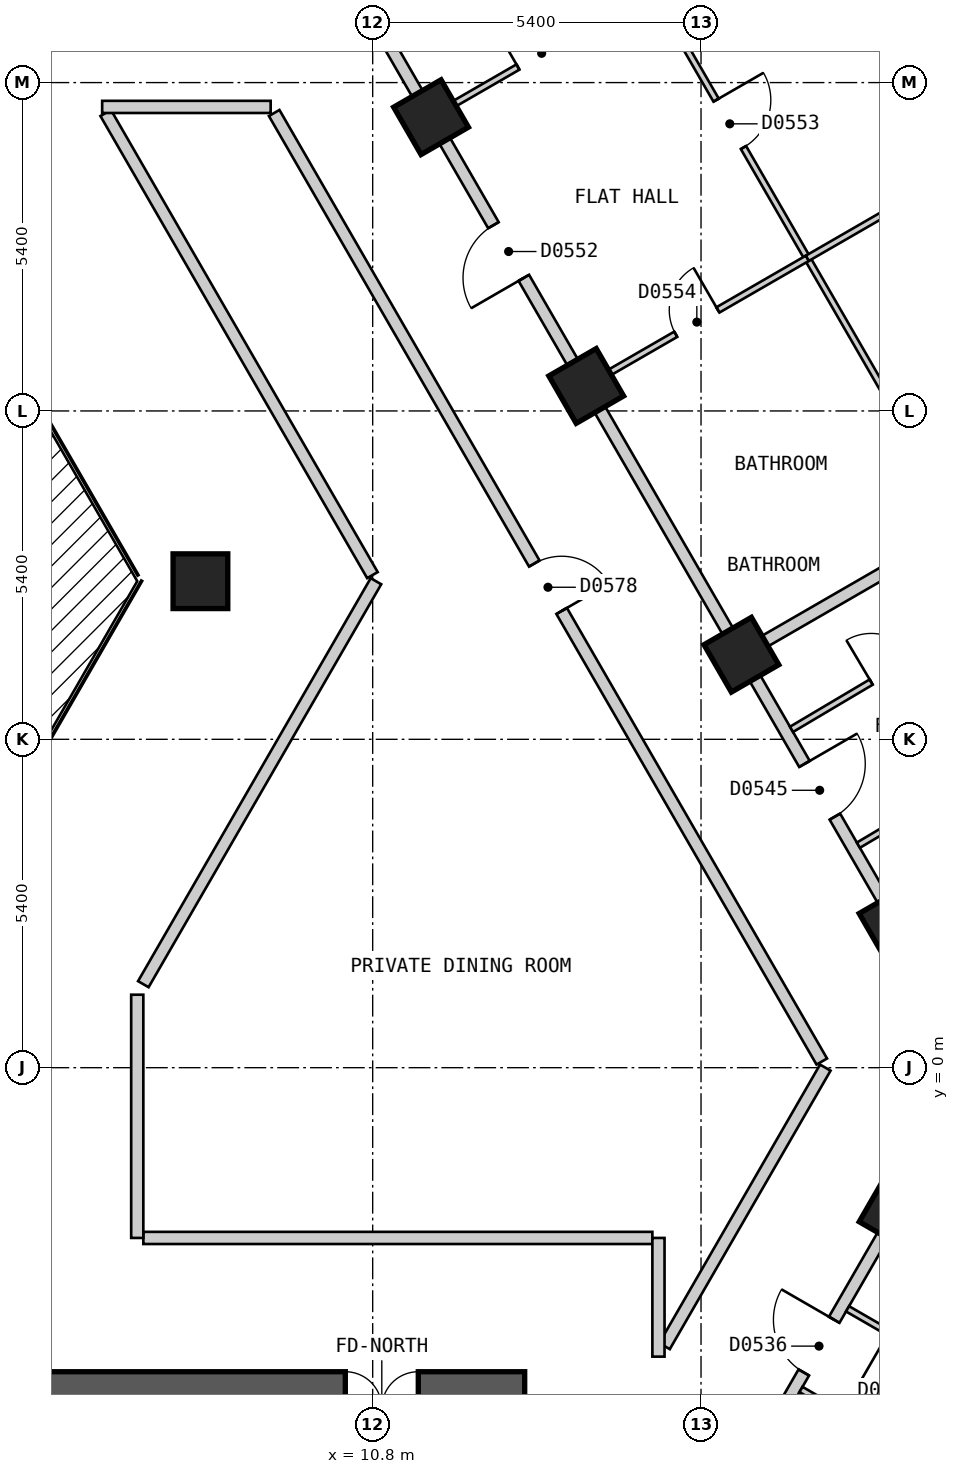
"""IFC4 building model, lengths in metres.
Left out: names, types, materials, properties, quantities, classifications, styles, units other than length and angle.
Written with IfcOpenShell. Run it as: python <this file> out.ifc"""

import sys

from ifc_helpers import new_model, si_unit, direction, frame, frame_2d, origin, origin_2d, place, context, subcontext, project, spatial, polyline, rectangle, outline, extrude, element, fill, save


model = new_model("IFC4")
c1 = context("Model", 3, precision=1e-05, world=origin(), true_north=direction((0.0, 1.0)))
c2 = subcontext(c1, "Body", "Model", "MODEL_VIEW")
j1 = project(units=[si_unit("LENGTHUNIT", "METRE"), si_unit("PLANEANGLEUNIT", "RADIAN")], contexts=[c1])
p1 = place(None, origin())
s1 = spatial("IfcSite", under=j1, at=p1, CompositionType="ELEMENT")
p2 = place(p1, origin())
s2 = spatial("IfcBuilding", under=s1, at=p2, CompositionType="ELEMENT")
p3 = place(p2, frame((0.0, 0.0, 56.4)))
s3 = spatial("IfcBuildingStorey", under=s2, at=p3, CompositionType="ELEMENT", Elevation=56.4)
for number, where, z_axis, x_axis in (
    (1, (19.417, -2.369, 0.0), (0.0, 0.0, 1.0), (0.5, 0.866, 0.0)),
    (2, (19.416, 2.371, 0.0), (0.0, 0.0, 1.0), (-0.5, 0.866, 0.0)),
    (3, (16.864, 6.791, 0.0), (0.0, 0.0, 1.0), (-0.5, 0.866, 0.0)),
    (4, (14.312, 11.211, 0.0), (0.0, 0.0, 1.0), (-0.5, 0.866, 0.0)),
    (5, (7.967, 8.0, 0.0), (0.0, 0.0, 1.0), (1.0, 0.0, 0.0)),
    (6, (11.76, 15.631, 0.0), (0.0, 0.0, 1.0), (-0.5, 0.866, 0.0)),
):
    element("IfcColumn", number, at=place(p3, frame(where, z_axis=z_axis, x_axis=x_axis)), inside=s3, PredefinedType="COLUMN", context=c2, shape_type="SweptSolid", body=[
        extrude(rectangle(XDim=0.9, YDim=0.9, at=origin_2d()), origin(), (0.0, 0.0, 1.0), 3.0),
    ])
p4 = place(p3, frame((-13.3, -5.6, 0.0), z_axis=(0.0, 0.0, 1.0), x_axis=(1.0, 0.0, 0.0)))
e7 = element("IfcWall", 7, at=p4, inside=s3, PredefinedType="SHEAR", context=c2, shape_type="SweptSolid", body=[
    extrude(rectangle(XDim=26.6, YDim=1.2, at=frame_2d((13.3, 0.0))), origin(), (0.0, 0.0, 1.0), 2.7),
])
p5 = place(p4, frame((23.65, 0.0, 0.0)))
e8 = element("IfcOpeningElement", 8, at=p5, cuts=e7, PredefinedType="OPENING", context=c2, shape_type="SweptSolid", body=[
    extrude(rectangle(XDim=1.2, YDim=2.1, at=frame_2d((0.6, 1.05))), frame((0.0, 0.61, 0.0), z_axis=(0.0, -1.0, 0.0), x_axis=(1.0, 0.0, 0.0)), (0.0, 0.0, 1.0), 1.22),
])
p6 = place(p3, frame((17.71, -25.825, 0.0), z_axis=(0.0, 0.0, 1.0), x_axis=(0.500001938803, 0.866024284413, 0.0)))
e9 = element("IfcWall", 9, at=p6, inside=s3, PredefinedType="SOLIDWALL", context=c2, shape_type="SweptSolid", body=[
    extrude(outline(polyline([(0.0, -0.15), (27.02, -0.15), (26.94, 0.15), (0.08, 0.15), (0.0, -0.15)])), origin(), (0.0, 0.0, 1.0), 2.7),
])
p7 = place(p6, frame((2.553, 0.0, 0.15)))
e10 = element("IfcOpeningElement", 10, at=p7, cuts=e9, PredefinedType="OPENING", context=c2, shape_type="SweptSolid", body=[
    extrude(rectangle(XDim=1.5, YDim=2.1, at=frame_2d((0.75, 1.05))), frame((0.0, 0.16, 0.0), z_axis=(0.0, -1.0, 0.0), x_axis=(1.0, 0.0, 0.0)), (0.0, 0.0, 1.0), 0.32),
])
p8 = place(p6, frame((7.658, 0.0, 0.15)))
e11 = element("IfcOpeningElement", 11, at=p8, cuts=e9, PredefinedType="OPENING", context=c2, shape_type="SweptSolid", body=[
    extrude(rectangle(XDim=1.5, YDim=2.1, at=frame_2d((0.75, 1.05))), frame((0.0, 0.16, 0.0), z_axis=(0.0, -1.0, 0.0), x_axis=(1.0, 0.0, 0.0)), (0.0, 0.0, 1.0), 0.32),
])
p9 = place(p6, frame((12.761, 0.0, 0.15)))
e12 = element("IfcOpeningElement", 12, at=p9, cuts=e9, PredefinedType="OPENING", context=c2, shape_type="SweptSolid", body=[
    extrude(rectangle(XDim=1.5, YDim=2.1, at=frame_2d((0.75, 1.05))), frame((0.0, 0.16, 0.0), z_axis=(0.0, -1.0, 0.0), x_axis=(1.0, 0.0, 0.0)), (0.0, 0.0, 1.0), 0.32),
])
p10 = place(p6, frame((17.865, 0.0, 0.15)))
e13 = element("IfcOpeningElement", 13, at=p10, cuts=e9, PredefinedType="OPENING", context=c2, shape_type="SweptSolid", body=[
    extrude(rectangle(XDim=1.5, YDim=2.1, at=frame_2d((0.75, 1.05))), frame((0.0, 0.16, 0.0), z_axis=(0.0, -1.0, 0.0), x_axis=(1.0, 0.0, 0.0)), (0.0, 0.0, 1.0), 0.32),
])
p11 = place(p6, frame((22.969, 0.0, 0.15)))
e14 = element("IfcOpeningElement", 14, at=p11, cuts=e9, PredefinedType="OPENING", context=c2, shape_type="SweptSolid", body=[
    extrude(rectangle(XDim=1.5, YDim=2.1, at=frame_2d((0.75, 1.05))), frame((0.0, 0.16, 0.0), z_axis=(0.0, -1.0, 0.0), x_axis=(1.0, 0.0, 0.0)), (0.0, 0.0, 1.0), 0.32),
])
p12 = place(p3, frame((31.22, 2.425, 0.0), z_axis=(0.0, 0.0, 1.0), x_axis=(-0.500001938803, 0.866024284413, 0.0)))
e15 = element("IfcWall", 15, at=p12, inside=s3, PredefinedType="SOLIDWALL", context=c2, shape_type="SweptSolid", body=[
    extrude(outline(polyline([(0.0, -0.15), (27.02, -0.15), (26.94, 0.15), (0.08, 0.15), (0.0, -0.15)])), origin(), (0.0, 0.0, 1.0), 2.7),
])
p13 = place(p12, frame((2.553, 0.0, 0.15)))
e16 = element("IfcOpeningElement", 16, at=p13, cuts=e15, PredefinedType="OPENING", context=c2, shape_type="SweptSolid", body=[
    extrude(rectangle(XDim=1.5, YDim=2.1, at=frame_2d((0.75, 1.05))), frame((0.0, 0.16, 0.0), z_axis=(0.0, -1.0, 0.0), x_axis=(1.0, 0.0, 0.0)), (0.0, 0.0, 1.0), 0.32),
])
p14 = place(p12, frame((7.657, 0.0, 0.15)))
e17 = element("IfcOpeningElement", 17, at=p14, cuts=e15, PredefinedType="OPENING", context=c2, shape_type="SweptSolid", body=[
    extrude(rectangle(XDim=1.5, YDim=2.1, at=frame_2d((0.75, 1.05))), frame((0.0, 0.16, 0.0), z_axis=(0.0, -1.0, 0.0), x_axis=(1.0, 0.0, 0.0)), (0.0, 0.0, 1.0), 0.32),
])
p15 = place(p12, frame((12.761, 0.0, 0.15)))
e18 = element("IfcOpeningElement", 18, at=p15, cuts=e15, PredefinedType="OPENING", context=c2, shape_type="SweptSolid", body=[
    extrude(rectangle(XDim=1.5, YDim=2.1, at=frame_2d((0.75, 1.05))), frame((0.0, 0.16, 0.0), z_axis=(0.0, -1.0, 0.0), x_axis=(1.0, 0.0, 0.0)), (0.0, 0.0, 1.0), 0.32),
])
p16 = place(p12, frame((17.865, 0.0, 0.15)))
e19 = element("IfcOpeningElement", 19, at=p16, cuts=e15, PredefinedType="OPENING", context=c2, shape_type="SweptSolid", body=[
    extrude(rectangle(XDim=1.5, YDim=2.1, at=frame_2d((0.75, 1.05))), frame((0.0, 0.16, 0.0), z_axis=(0.0, -1.0, 0.0), x_axis=(1.0, 0.0, 0.0)), (0.0, 0.0, 1.0), 0.32),
])
p17 = place(p12, frame((22.969, 0.0, 0.15)))
e20 = element("IfcOpeningElement", 20, at=p17, cuts=e15, PredefinedType="OPENING", context=c2, shape_type="SweptSolid", body=[
    extrude(rectangle(XDim=1.5, YDim=2.1, at=frame_2d((0.75, 1.05))), frame((0.0, 0.16, 0.0), z_axis=(0.0, -1.0, 0.0), x_axis=(1.0, 0.0, 0.0)), (0.0, 0.0, 1.0), 0.32),
])
p18 = place(p3, frame((6.409, 15.7, 0.0), z_axis=(0.0, 0.0, 1.0), x_axis=(0.499930377127, -0.866065596838, 0.0)))
e21 = element("IfcWall", 21, at=p18, inside=s3, PredefinedType="PARTITIONING", context=c2, shape_type="SweptSolid", body=[
    extrude(rectangle(XDim=8.775, YDim=0.2, at=frame_2d((4.388, 0.0))), origin(), (0.0, 0.0, 1.0), 2.7),
])
p19 = place(p3, frame((9.18, 15.7, 0.0), z_axis=(0.0, 0.0, 1.0), x_axis=(0.500003652032, -0.866023295272, 0.0)))
e22 = element("IfcWall", 22, at=p19, inside=s3, PredefinedType="PARTITIONING", context=c2, shape_type="SweptSolid", body=[
    extrude(rectangle(XDim=18.012, YDim=0.2, at=frame_2d((9.006, 0.0))), origin(), (0.0, 0.0, 1.0), 2.7),
])
p20 = place(p19, frame((8.556, 0.0, 0.0)))
e23 = element("IfcOpeningElement", 23, at=p20, cuts=e22, PredefinedType="OPENING", context=c2, shape_type="SweptSolid", body=[
    extrude(rectangle(XDim=0.9, YDim=2.1, at=frame_2d((0.45, 1.05))), frame((0.0, 0.11, 0.0), z_axis=(0.0, -1.0, 0.0), x_axis=(1.0, 0.0, 0.0)), (0.0, 0.0, 1.0), 0.22),
])
p21 = place(p3, frame((10.45, 17.9, 0.0), z_axis=(0.0, 0.0, 1.0), x_axis=(0.500034352617, -0.866005569383, 0.0)))
e24 = element("IfcWall", 24, at=p21, inside=s3, PredefinedType="PARTITIONING", context=c2, shape_type="SweptSolid", body=[
    extrude(rectangle(XDim=20.553, YDim=0.2, at=frame_2d((10.276, 0.0))), origin(), (0.0, 0.0, 1.0), 2.7),
])
p22 = place(p21, frame((14.902, 0.0, 0.0)))
e25 = element("IfcOpeningElement", 25, at=p22, cuts=e24, PredefinedType="OPENING", context=c2, shape_type="SweptSolid", body=[
    extrude(rectangle(XDim=1.0, YDim=2.1, at=frame_2d((0.5, 1.05))), frame((0.0, 0.11, 0.0), z_axis=(0.0, -1.0, 0.0), x_axis=(1.0, 0.0, 0.0)), (0.0, 0.0, 1.0), 0.22),
])
p23 = place(p21, frame((4.671, 0.0, 0.0)))
e26 = element("IfcOpeningElement", 26, at=p23, cuts=e24, PredefinedType="OPENING", context=c2, shape_type="SweptSolid", body=[
    extrude(rectangle(XDim=1.0, YDim=2.1, at=frame_2d((0.5, 1.05))), frame((0.0, 0.11, 0.0), z_axis=(0.0, -1.0, 0.0), x_axis=(1.0, 0.0, 0.0)), (0.0, 0.0, 1.0), 0.22),
])
p24 = place(p3, frame((7.028, -2.8, 0.0), z_axis=(0.0, 0.0, 1.0), x_axis=(1.0, 0.0, 0.0)))
e27 = element("IfcWall", 27, at=p24, inside=s3, PredefinedType="PARTITIONING", context=c2, shape_type="SweptSolid", body=[
    extrude(rectangle(XDim=8.372, YDim=0.2, at=frame_2d((4.186, 0.0))), origin(), (0.0, 0.0, 1.0), 2.7),
])
p25 = place(p3, frame((6.351, 15.8, 0.0), z_axis=(0.0, 0.0, 1.0), x_axis=(1.0, 0.0, 0.0)))
e28 = element("IfcWall", 28, at=p25, inside=s3, PredefinedType="PARTITIONING", context=c2, shape_type="SweptSolid", body=[
    extrude(rectangle(XDim=2.771, YDim=0.2, at=frame_2d((1.385, 0.0))), origin(), (0.0, 0.0, 1.0), 2.7),
])
p26 = place(p3, frame((7.028, 1.373, 0.0), z_axis=(0.0, 0.0, 1.0), x_axis=(0.49998574534, 0.86603363356, 0.0)))
e29 = element("IfcWall", 29, at=p26, inside=s3, PredefinedType="PARTITIONING", context=c2, shape_type="SweptSolid", body=[
    extrude(rectangle(XDim=7.652, YDim=0.2, at=frame_2d((3.826, 0.0))), origin(), (0.0, 0.0, 1.0), 2.7),
])
p27 = place(p3, frame((15.6, -4.579, 0.0), z_axis=(0.0, 0.0, 1.0), x_axis=(0.499927597274, 0.866067201483, 0.0)))
e30 = element("IfcWall", 30, at=p27, inside=s3, PredefinedType="PARTITIONING", context=c2, shape_type="SweptSolid", body=[
    extrude(rectangle(XDim=5.288, YDim=0.2, at=frame_2d((2.644, 0.0))), origin(), (0.0, 0.0, 1.0), 2.7),
])
p28 = place(p3, frame((15.707, -8.794, 0.0), z_axis=(0.0, 0.0, 1.0), x_axis=(0.50000451406, 0.866022797575, 0.0)))
e31 = element("IfcWall", 31, at=p28, inside=s3, PredefinedType="PARTITIONING", context=c2, shape_type="SweptSolid", body=[
    extrude(rectangle(XDim=10.04, YDim=0.2, at=frame_2d((5.02, 0.0))), origin(), (0.0, 0.0, 1.0), 2.7),
])
p29 = place(p28, frame((4.367, 0.0, 0.0)))
e32 = element("IfcOpeningElement", 32, at=p29, cuts=e31, PredefinedType="OPENING", context=c2, shape_type="SweptSolid", body=[
    extrude(rectangle(XDim=1.0, YDim=2.1, at=frame_2d((0.5, 1.05))), frame((0.0, 0.11, 0.0), z_axis=(0.0, -1.0, 0.0), x_axis=(1.0, 0.0, 0.0)), (0.0, 0.0, 1.0), 0.22),
])
p30 = place(p28, frame((8.402, 0.0, 0.0)))
e33 = element("IfcOpeningElement", 33, at=p30, cuts=e31, PredefinedType="OPENING", context=c2, shape_type="SweptSolid", body=[
    extrude(rectangle(XDim=0.8, YDim=2.1, at=frame_2d((0.4, 1.05))), frame((0.0, 0.11, 0.0), z_axis=(0.0, -1.0, 0.0), x_axis=(1.0, 0.0, 0.0)), (0.0, 0.0, 1.0), 0.22),
])
p31 = place(p3, frame((6.928, -2.8, 0.0), z_axis=(0.0, 0.0, 1.0), x_axis=(0.0, 1.0, 0.0)))
e34 = element("IfcWall", 34, at=p31, inside=s3, PredefinedType="PARTITIONING", context=c2, shape_type="SweptSolid", body=[
    extrude(rectangle(XDim=4.0, YDim=0.2, at=frame_2d((2.0, 0.0))), origin(), (0.0, 0.0, 1.0), 2.7),
])
p32 = place(p3, frame((15.5, -4.752, 0.0), z_axis=(0.0, 0.0, 1.0), x_axis=(0.0, 1.0, 0.0)))
e35 = element("IfcWall", 35, at=p32, inside=s3, PredefinedType="PARTITIONING", context=c2, shape_type="SweptSolid", body=[
    extrude(rectangle(XDim=1.952, YDim=0.2, at=frame_2d((0.976, 0.0))), origin(), (0.0, 0.0, 1.0), 2.7),
])
p33 = place(p3, frame((12.875, 22.1, 0.0), z_axis=(0.0, 0.0, 1.0), x_axis=(0.499994897061, -0.866028349948, 0.0)))
e36 = element("IfcWall", 36, at=p33, inside=s3, PredefinedType="PARTITIONING", context=c2, shape_type="SweptSolid", body=[
    extrude(rectangle(XDim=15.152, YDim=0.1, at=frame_2d((7.576, 0.0))), origin(), (0.0, 0.0, 1.0), 2.7),
])
p34 = place(p33, frame((7.146, 0.0, 0.0)))
e37 = element("IfcOpeningElement", 37, at=p34, cuts=e36, PredefinedType="OPENING", context=c2, shape_type="SweptSolid", body=[
    extrude(rectangle(XDim=0.9, YDim=2.1, at=frame_2d((0.45, 1.05))), frame((0.0, 0.06, 0.0), z_axis=(0.0, -1.0, 0.0), x_axis=(1.0, 0.0, 0.0)), (0.0, 0.0, 1.0), 0.12),
])
p35 = place(p3, frame((17.844, -5.292, 0.0), z_axis=(0.0, 0.0, 1.0), x_axis=(0.866038211682, -0.499977815414, 0.0)))
e38 = element("IfcWall", 38, at=p35, inside=s3, PredefinedType="PARTITIONING", context=c2, shape_type="SweptSolid", body=[
    extrude(rectangle(XDim=2.51, YDim=0.1, at=frame_2d((1.255, 0.0))), origin(), (0.0, 0.0, 1.0), 2.7),
])
p36 = place(p35, frame((0.83, 0.0, 0.0)))
e39 = element("IfcOpeningElement", 39, at=p36, cuts=e38, PredefinedType="OPENING", context=c2, shape_type="SweptSolid", body=[
    extrude(rectangle(XDim=0.8, YDim=2.1, at=frame_2d((0.4, 1.05))), frame((0.0, 0.06, 0.0), z_axis=(0.0, -1.0, 0.0), x_axis=(1.0, 0.0, 0.0)), (0.0, 0.0, 1.0), 0.12),
])
p37 = place(p3, frame((18.61, -3.966, 0.0), z_axis=(0.0, 0.0, 1.0), x_axis=(0.865958718457, -0.500115484592, 0.0)))
e40 = element("IfcWall", 40, at=p37, inside=s3, PredefinedType="PARTITIONING", context=c2, shape_type="SweptSolid", body=[
    extrude(rectangle(XDim=2.509, YDim=0.1, at=frame_2d((1.255, 0.0))), origin(), (0.0, 0.0, 1.0), 2.7),
])
p38 = place(p37, frame((0.78, 0.0, 0.0)))
e41 = element("IfcOpeningElement", 41, at=p38, cuts=e40, PredefinedType="OPENING", context=c2, shape_type="SweptSolid", body=[
    extrude(rectangle(XDim=0.9, YDim=2.1, at=frame_2d((0.45, 1.05))), frame((0.0, 0.06, 0.0), z_axis=(0.0, -1.0, 0.0), x_axis=(1.0, 0.0, 0.0)), (0.0, 0.0, 1.0), 0.12),
])
p39 = place(p3, frame((11.847, 15.681, 0.0), z_axis=(0.0, 0.0, 1.0), x_axis=(0.865980278416, 0.500078151287, 0.0)))
e42 = element("IfcWall", 42, at=p39, inside=s3, PredefinedType="PARTITIONING", context=c2, shape_type="SweptSolid", body=[
    extrude(rectangle(XDim=4.099, YDim=0.1, at=frame_2d((2.05, 0.0))), origin(), (0.0, 0.0, 1.0), 2.7),
])
p40 = place(p39, frame((1.55, 0.0, 0.0)))
e43 = element("IfcOpeningElement", 43, at=p40, cuts=e42, PredefinedType="OPENING", context=c2, shape_type="SweptSolid", body=[
    extrude(rectangle(XDim=0.9, YDim=2.1, at=frame_2d((0.45, 1.05))), frame((0.0, 0.06, 0.0), z_axis=(0.0, -1.0, 0.0), x_axis=(1.0, 0.0, 0.0)), (0.0, 0.0, 1.0), 0.12),
])
p41 = place(p3, frame((14.399, 11.261, 0.0), z_axis=(0.0, 0.0, 1.0), x_axis=(0.865980278416, 0.500078151287, 0.0)))
e44 = element("IfcWall", 44, at=p41, inside=s3, PredefinedType="PARTITIONING", context=c2, shape_type="SweptSolid", body=[
    extrude(rectangle(XDim=4.099, YDim=0.1, at=frame_2d((2.05, 0.0))), origin(), (0.0, 0.0, 1.0), 2.7),
])
p42 = place(p41, frame((1.6, 0.0, 0.0)))
e45 = element("IfcOpeningElement", 45, at=p42, cuts=e44, PredefinedType="OPENING", context=c2, shape_type="SweptSolid", body=[
    extrude(rectangle(XDim=0.8, YDim=2.1, at=frame_2d((0.4, 1.05))), frame((0.0, 0.06, 0.0), z_axis=(0.0, -1.0, 0.0), x_axis=(1.0, 0.0, 0.0)), (0.0, 0.0, 1.0), 0.12),
])
p43 = place(p3, frame((17.688, 5.564, 0.0), z_axis=(0.0, 0.0, 1.0), x_axis=(0.860107296662, 0.510113162179, 0.0)))
e46 = element("IfcWall", 46, at=p43, inside=s3, PredefinedType="PARTITIONING", context=c2, shape_type="SweptSolid", body=[
    extrude(rectangle(XDim=3.897, YDim=0.1, at=frame_2d((1.949, 0.0))), origin(), (0.0, 0.0, 1.0), 2.7),
])
p44 = place(p43, frame((1.524, 0.0, 0.0)))
e47 = element("IfcOpeningElement", 47, at=p44, cuts=e46, PredefinedType="OPENING", context=c2, shape_type="SweptSolid", body=[
    extrude(rectangle(XDim=0.8, YDim=2.1, at=frame_2d((0.4, 1.05))), frame((0.0, 0.06, 0.0), z_axis=(0.0, -1.0, 0.0), x_axis=(1.0, 0.0, 0.0)), (0.0, 0.0, 1.0), 0.12),
])
p45 = place(p3, frame((18.788, 3.659, 0.0), z_axis=(0.0, 0.0, 1.0), x_axis=(0.860090994311, 0.510140648749, 0.0)))
e48 = element("IfcWall", 48, at=p45, inside=s3, PredefinedType="PARTITIONING", context=c2, shape_type="SweptSolid", body=[
    extrude(rectangle(XDim=3.897, YDim=0.1, at=frame_2d((1.948, 0.0))), origin(), (0.0, 0.0, 1.0), 2.7),
])
p46 = place(p45, frame((1.474, 0.0, 0.0)))
e49 = element("IfcOpeningElement", 49, at=p46, cuts=e48, PredefinedType="OPENING", context=c2, shape_type="SweptSolid", body=[
    extrude(rectangle(XDim=0.9, YDim=2.1, at=frame_2d((0.45, 1.05))), frame((0.0, 0.06, 0.0), z_axis=(0.0, -1.0, 0.0), x_axis=(1.0, 0.0, 0.0)), (0.0, 0.0, 1.0), 0.12),
])
p47 = place(p3, frame((16.95, 6.841, 0.0), z_axis=(0.0, 0.0, 1.0), x_axis=(0.866031112038, 0.499990112884, 0.0)))
e50 = element("IfcWall", 50, at=p47, inside=s3, PredefinedType="PARTITIONING", context=c2, shape_type="SweptSolid", body=[
    extrude(rectangle(XDim=3.948, YDim=0.2, at=frame_2d((1.974, 0.0))), origin(), (0.0, 0.0, 1.0), 2.7),
])
p48 = place(p3, frame((17.949, 13.311, 0.0), z_axis=(0.0, 0.0, 1.0), x_axis=(0.866052608538, 0.499952877023, 0.0)))
e51 = element("IfcWall", 51, at=p48, inside=s3, PredefinedType="PARTITIONING", context=c2, shape_type="SweptSolid", body=[
    extrude(rectangle(XDim=5.9, YDim=0.1, at=frame_2d((2.95, 0.0))), origin(), (0.0, 0.0, 1.0), 2.7),
])
p49 = place(p48, frame((2.5, 0.0, 0.0)))
e52 = element("IfcOpeningElement", 52, at=p49, cuts=e51, PredefinedType="OPENING", context=c2, shape_type="SweptSolid", body=[
    extrude(rectangle(XDim=0.9, YDim=2.1, at=frame_2d((0.45, 1.05))), frame((0.0, 0.06, 0.0), z_axis=(0.0, -1.0, 0.0), x_axis=(1.0, 0.0, 0.0)), (0.0, 0.0, 1.0), 0.12),
])
p50 = place(p29, origin())
e53 = element("IfcDoor", 53, at=p50, inside=s3, OperationType="SINGLE_SWING_RIGHT", PredefinedType="DOOR", context=c2, shape_type="SweptSolid", body=[
    extrude(rectangle(XDim=1.0, YDim=2.1, at=frame_2d((0.5, 1.05))), frame((0.0, 0.025, 0.0), z_axis=(0.0, -1.0, 0.0), x_axis=(1.0, 0.0, 0.0)), (0.0, 0.0, 1.0), 0.05),
])
fill(e32, e53)
p51 = place(p22, origin())
e54 = element("IfcDoor", 54, at=p51, inside=s3, OperationType="SINGLE_SWING_LEFT", PredefinedType="DOOR", context=c2, shape_type="SweptSolid", body=[
    extrude(rectangle(XDim=1.0, YDim=2.1, at=frame_2d((0.5, 1.05))), frame((0.0, 0.025, 0.0), z_axis=(0.0, -1.0, 0.0), x_axis=(1.0, 0.0, 0.0)), (0.0, 0.0, 1.0), 0.05),
])
fill(e25, e54)
p52 = place(p44, origin())
e55 = element("IfcDoor", 55, at=p52, inside=s3, OperationType="SINGLE_SWING_LEFT", PredefinedType="DOOR", context=c2, shape_type="SweptSolid", body=[
    extrude(rectangle(XDim=0.8, YDim=2.1, at=frame_2d((0.4, 1.05))), frame((0.0, 0.025, 0.0), z_axis=(0.0, -1.0, 0.0), x_axis=(1.0, 0.0, 0.0)), (0.0, 0.0, 1.0), 0.05),
])
fill(e47, e55)
p53 = place(p23, origin())
e56 = element("IfcDoor", 56, at=p53, inside=s3, OperationType="SINGLE_SWING_RIGHT", PredefinedType="DOOR", context=c2, shape_type="SweptSolid", body=[
    extrude(rectangle(XDim=1.0, YDim=2.1, at=frame_2d((0.5, 1.05))), frame((0.0, 0.025, 0.0), z_axis=(0.0, -1.0, 0.0), x_axis=(1.0, 0.0, 0.0)), (0.0, 0.0, 1.0), 0.05),
])
fill(e26, e56)
p54 = place(p34, origin())
e57 = element("IfcDoor", 57, at=p54, inside=s3, OperationType="SINGLE_SWING_LEFT", PredefinedType="DOOR", context=c2, shape_type="SweptSolid", body=[
    extrude(rectangle(XDim=0.9, YDim=2.1, at=frame_2d((0.45, 1.05))), frame((0.0, 0.025, 0.0), z_axis=(0.0, -1.0, 0.0), x_axis=(1.0, 0.0, 0.0)), (0.0, 0.0, 1.0), 0.05),
])
fill(e37, e57)
p55 = place(p42, origin())
e58 = element("IfcDoor", 58, at=p55, inside=s3, OperationType="SINGLE_SWING_RIGHT", PredefinedType="DOOR", context=c2, shape_type="SweptSolid", body=[
    extrude(rectangle(XDim=0.8, YDim=2.1, at=frame_2d((0.4, 1.05))), frame((0.0, 0.025, 0.0), z_axis=(0.0, -1.0, 0.0), x_axis=(1.0, 0.0, 0.0)), (0.0, 0.0, 1.0), 0.05),
])
fill(e45, e58)
p56 = place(p40, origin())
e59 = element("IfcDoor", 59, at=p56, inside=s3, OperationType="SINGLE_SWING_LEFT", PredefinedType="DOOR", context=c2, shape_type="SweptSolid", body=[
    extrude(rectangle(XDim=0.9, YDim=2.1, at=frame_2d((0.45, 1.05))), frame((0.0, 0.025, 0.0), z_axis=(0.0, -1.0, 0.0), x_axis=(1.0, 0.0, 0.0)), (0.0, 0.0, 1.0), 0.05),
])
fill(e43, e59)
p57 = place(p20, origin())
e60 = element("IfcDoor", 60, at=p57, inside=s3, OperationType="SINGLE_SWING_RIGHT", PredefinedType="DOOR", context=c2, shape_type="SweptSolid", body=[
    extrude(rectangle(XDim=0.9, YDim=2.1, at=frame_2d((0.45, 1.05))), frame((0.0, 0.025, 0.0), z_axis=(0.0, -1.0, 0.0), x_axis=(1.0, 0.0, 0.0)), (0.0, 0.0, 1.0), 0.05),
])
fill(e23, e60)
save(model, sys.argv[1])
